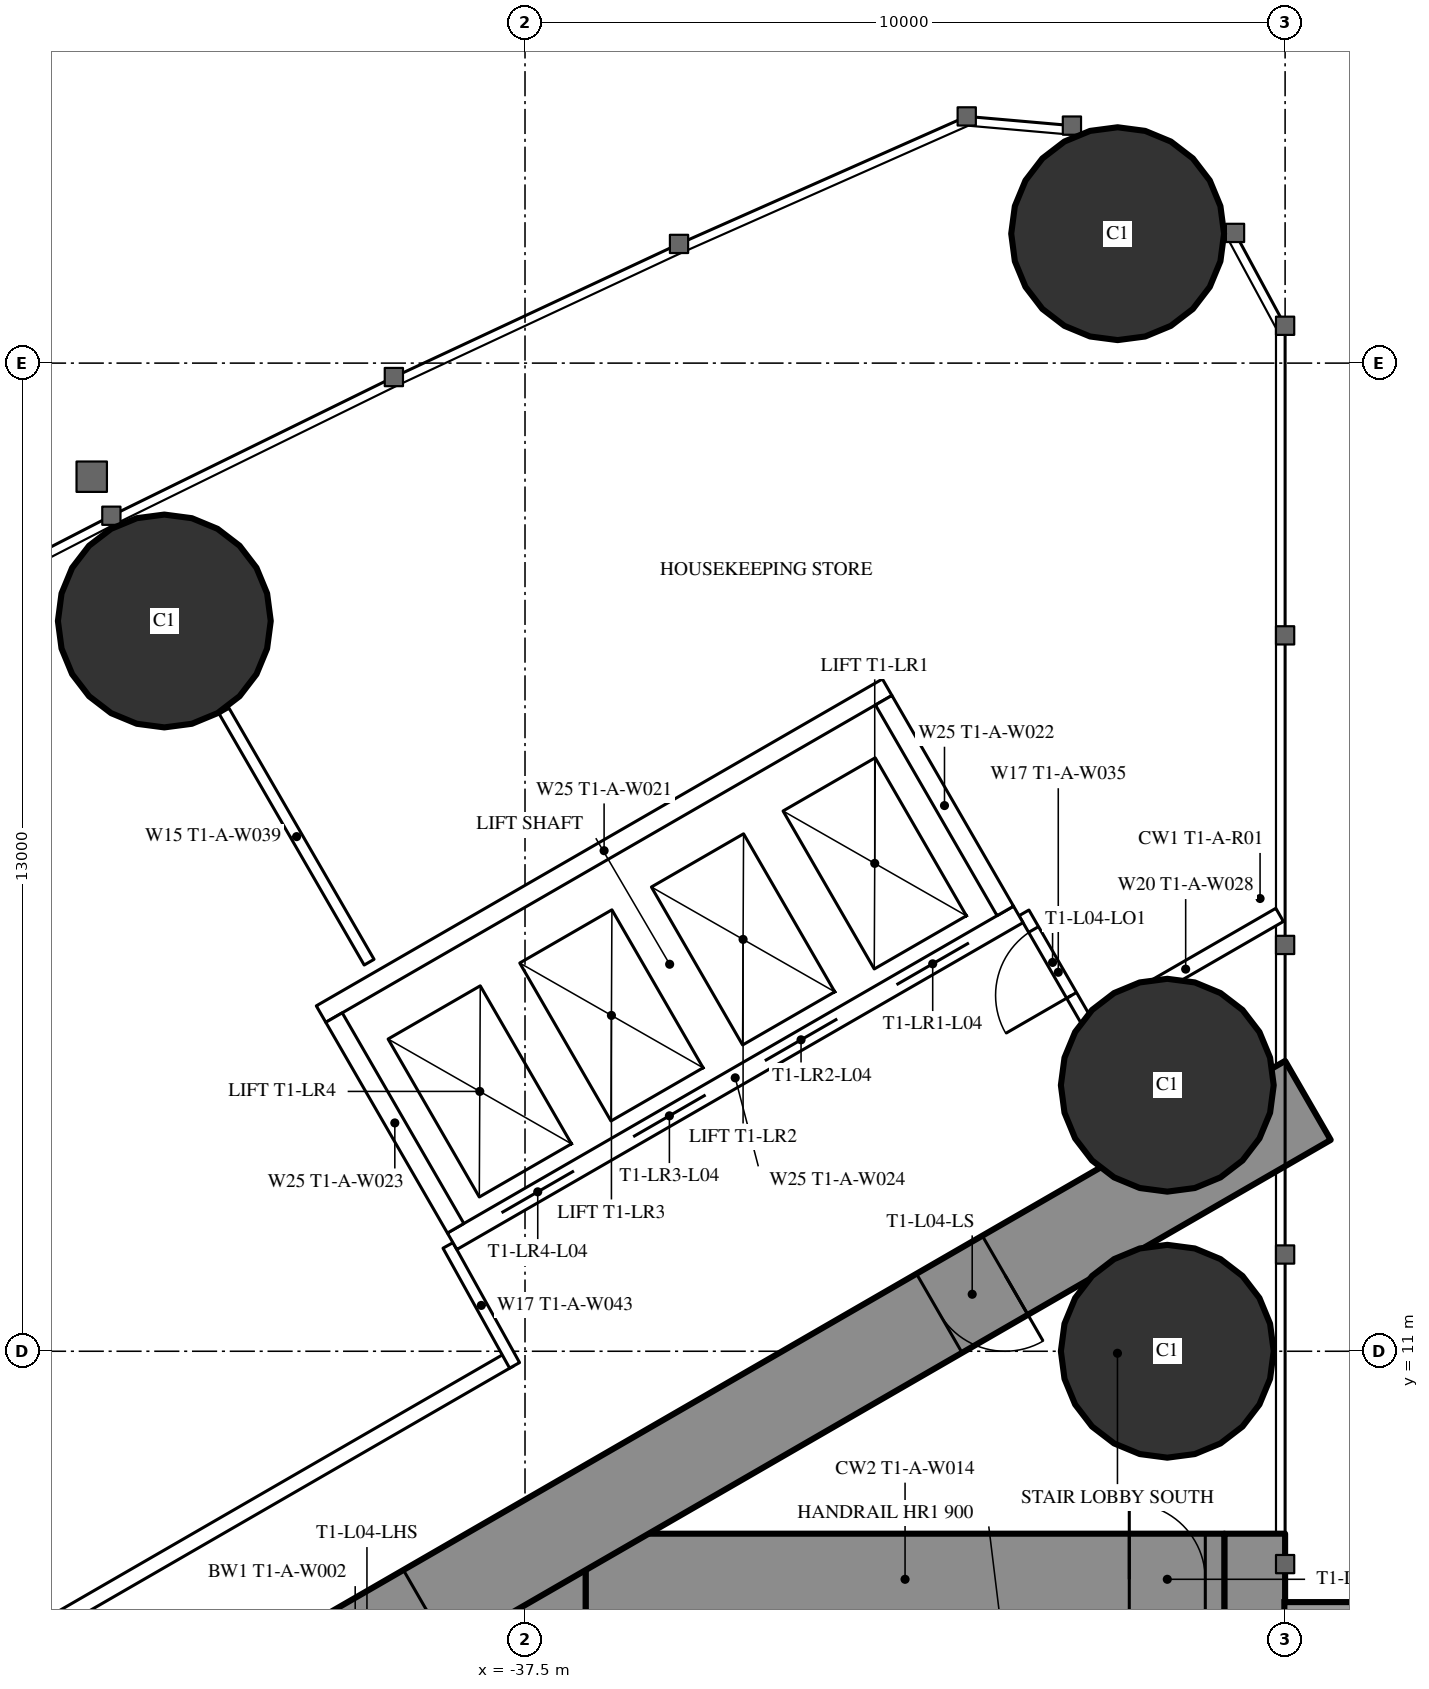
"""IFC4 building model, lengths in metres.
Left out: names, types, materials, properties, quantities, classifications, styles, units other than length and angle.
Written with IfcOpenShell. Run it as: python <this file> out.ifc"""

import sys

from ifc_helpers import new_model, si_unit, direction, frame, frame_2d, origin, origin_2d, place, context, subcontext, project, spatial, rectangle, hollow_circle, extrude, element, fill, save


model = new_model("IFC4")
c1 = context("Model", 3, precision=1e-05, world=origin(), true_north=direction((0.0, 1.0)))
c2 = subcontext(c1, "Body", "Model", "MODEL_VIEW")
j1 = project(units=[si_unit("LENGTHUNIT", "METRE"), si_unit("PLANEANGLEUNIT", "RADIAN")], contexts=[c1])
p1 = place(None, origin())
s1 = spatial("IfcSite", under=j1, at=p1, CompositionType="ELEMENT")
p2 = place(p1, origin())
s2 = spatial("IfcBuilding", under=s1, at=p2, CompositionType="ELEMENT")
p3 = place(p2, frame((0.0, 0.0, 21.5)))
s3 = spatial("IfcBuildingStorey", under=s2, at=p3, CompositionType="ELEMENT", Elevation=21.5)
for number, where, z_axis, x_axis in (
    (1, (-29.703, 25.703, 0.0), (0.0, 0.0, 1.0), (1.0, 0.0, 0.0)),
    (2, (-29.05, 11.0, 0.0), (0.0, 0.0, 1.0), (1.0, 0.0, 0.0)),
    (3, (-29.05, 14.5, 0.0), (0.0, 0.0, 1.0), (1.0, 0.0, 0.0)),
    (4, (-42.245, 20.607, 0.0), (0.0, 0.0, 1.0), (1.0, 0.0, 0.0)),
):
    element("IfcColumn", number, at=place(p3, frame(where, z_axis=z_axis, x_axis=x_axis)), inside=s3, PredefinedType="COLUMN", context=c2, shape_type="SweptSolid", body=[
        extrude(hollow_circle(Radius=1.4, WallThickness=0.12, at=origin_2d()), origin(), (0.0, 0.0, 1.0), 3.5),
    ])
p4 = place(p3, frame((-27.9, 8.6, 0.0), z_axis=(0.0, 0.0, 1.0), x_axis=(0.0, -1.0, 0.0)))
e5 = element("IfcWall", 5, at=p4, inside=s3, PredefinedType="SHEAR", context=c2, shape_type="SweptSolid", body=[
    extrude(rectangle(XDim=17.2, YDim=0.8, at=frame_2d((8.6, 0.0))), origin(), (0.0, 0.0, 1.0), 3.5),
])
p5 = place(p4, frame((2.45, 0.0, 0.6)))
e6 = element("IfcOpeningElement", 6, at=p5, cuts=e5, PredefinedType="OPENING", context=c2, shape_type="SweptSolid", body=[
    extrude(rectangle(XDim=0.6, YDim=2.1, at=frame_2d((0.3, 1.05))), frame((0.0, 0.41, 0.0), z_axis=(0.0, -1.0, 0.0), x_axis=(1.0, 0.0, 0.0)), (0.0, 0.0, 1.0), 0.82),
])
p6 = place(p4, frame((14.15, 0.0, 0.6)))
e7 = element("IfcOpeningElement", 7, at=p6, cuts=e5, PredefinedType="OPENING", context=c2, shape_type="SweptSolid", body=[
    extrude(rectangle(XDim=0.6, YDim=2.1, at=frame_2d((0.3, 1.05))), frame((0.0, 0.41, 0.0), z_axis=(0.0, -1.0, 0.0), x_axis=(1.0, 0.0, 0.0)), (0.0, 0.0, 1.0), 0.82),
])
p7 = place(p3, frame((-37.3, 8.6, 0.0), z_axis=(0.0, 0.0, 1.0), x_axis=(0.0, -1.0, 0.0)))
e8 = element("IfcWall", 8, at=p7, inside=s3, PredefinedType="SHEAR", context=c2, shape_type="SweptSolid", body=[
    extrude(rectangle(XDim=17.2, YDim=1.2, at=frame_2d((8.6, 0.0))), origin(), (0.0, 0.0, 1.0), 3.5),
])
p8 = place(p7, frame((7.7, 0.0, 0.0)))
e9 = element("IfcOpeningElement", 9, at=p8, cuts=e8, PredefinedType="OPENING", context=c2, shape_type="SweptSolid", body=[
    extrude(rectangle(XDim=1.8, YDim=2.2, at=frame_2d((0.9, 1.1))), frame((0.0, 0.61, 0.0), z_axis=(0.0, -1.0, 0.0), x_axis=(1.0, 0.0, 0.0)), (0.0, 0.0, 1.0), 1.22),
])
p9 = place(p3, frame((-28.3, 8.0, 0.0), z_axis=(0.0, 0.0, 1.0), x_axis=(-1.0, 0.0, 0.0)))
e10 = element("IfcWall", 10, at=p9, inside=s3, PredefinedType="SHEAR", context=c2, shape_type="SweptSolid", body=[
    extrude(rectangle(XDim=8.4, YDim=1.2, at=frame_2d((4.2, 0.0))), origin(), (0.0, 0.0, 1.0), 3.5),
])
p10 = place(p9, frame((0.25, 0.0, 0.0)))
e11 = element("IfcOpeningElement", 11, at=p10, cuts=e10, PredefinedType="OPENING", context=c2, shape_type="SweptSolid", body=[
    extrude(rectangle(XDim=1.0, YDim=2.2, at=frame_2d((0.5, 1.1))), frame((0.0, 0.61, 0.0), z_axis=(0.0, -1.0, 0.0), x_axis=(1.0, 0.0, 0.0)), (0.0, 0.0, 1.0), 1.22),
])
p11 = place(p3, frame((-27.2, 14.3, 0.0), z_axis=(0.0, 0.0, 1.0), x_axis=(-0.866026593062, -0.499997940104, 0.0)))
e12 = element("IfcWall", 12, at=p11, inside=s3, PredefinedType="SHEAR", context=c2, shape_type="SweptSolid", body=[
    extrude(rectangle(XDim=28.946, YDim=1.2, at=frame_2d((14.473, 0.0))), origin(), (0.0, 0.0, 1.0), 3.5),
])
p12 = place(p11, frame((4.6, 0.0, 0.0)))
e13 = element("IfcOpeningElement", 13, at=p12, cuts=e12, PredefinedType="OPENING", context=c2, shape_type="SweptSolid", body=[
    extrude(rectangle(XDim=1.0, YDim=2.2, at=frame_2d((0.5, 1.1))), frame((0.0, 0.61, 0.0), z_axis=(0.0, -1.0, 0.0), x_axis=(1.0, 0.0, 0.0)), (0.0, 0.0, 1.0), 1.22),
])
p13 = place(p11, frame((13.395, 0.0, 0.0)))
e14 = element("IfcOpeningElement", 14, at=p13, cuts=e12, PredefinedType="OPENING", context=c2, shape_type="SweptSolid", body=[
    extrude(rectangle(XDim=1.8, YDim=2.2, at=frame_2d((0.9, 1.1))), frame((0.0, 0.61, 0.0), z_axis=(0.0, -1.0, 0.0), x_axis=(1.0, 0.0, 0.0)), (0.0, 0.0, 1.0), 1.22),
])
p14 = place(p3, frame((-39.551, 16.119, 0.0), z_axis=(0.0, 0.0, 1.0), x_axis=(-0.500014214979, 0.866017196607, 0.0)))
e15 = element("IfcWall", 15, at=p14, inside=s3, PredefinedType="PARTITIONING", context=c2, shape_type="SweptSolid", body=[
    extrude(rectangle(XDim=3.815, YDim=0.15, at=frame_2d((1.907, 0.0))), origin(), (0.0, 0.0, 1.0), 3.25),
])
p15 = place(p3, frame((-27.572, 16.741, 0.0), z_axis=(0.0, 0.0, 1.0), x_axis=(-0.866034618596, -0.499984039138, 0.0)))
e16 = element("IfcWall", 16, at=p15, inside=s3, PredefinedType="PARTITIONING", context=c2, shape_type="SweptSolid", body=[
    extrude(rectangle(XDim=2.854, YDim=0.2, at=frame_2d((1.427, 0.0))), origin(), (0.0, 0.0, 1.0), 3.25),
])
p16 = place(p3, frame((-37.7, 10.894, 0.0), z_axis=(0.0, 0.0, 1.0), x_axis=(-0.866027905338, -0.499995667157, 0.0)))
e17 = element("IfcWall", 17, at=p16, inside=s3, PredefinedType="PARTITIONING", context=c2, shape_type="SweptSolid", body=[
    extrude(rectangle(XDim=21.787, YDim=0.2, at=frame_2d((10.894, 0.0))), origin(), (0.0, 0.0, 1.0), 3.25),
])
p17 = place(p16, frame((11.78, 0.0, 0.0)))
e18 = element("IfcOpeningElement", 18, at=p17, cuts=e17, PredefinedType="OPENING", context=c2, shape_type="SweptSolid", body=[
    extrude(rectangle(XDim=0.95, YDim=2.2, at=frame_2d((0.475, 1.1))), frame((0.0, 0.11, 0.0), z_axis=(0.0, -1.0, 0.0), x_axis=(1.0, 0.0, 0.0)), (0.0, 0.0, 1.0), 0.22),
])
p18 = place(p16, frame((7.73, 0.0, 0.0)))
e19 = element("IfcOpeningElement", 19, at=p18, cuts=e17, PredefinedType="OPENING", context=c2, shape_type="SweptSolid", body=[
    extrude(rectangle(XDim=0.95, YDim=2.2, at=frame_2d((0.475, 1.1))), frame((0.0, 0.11, 0.0), z_axis=(0.0, -1.0, 0.0), x_axis=(1.0, 0.0, 0.0)), (0.0, 0.0, 1.0), 0.22),
])
p19 = place(p3, frame((-38.513, 12.392, 0.0), z_axis=(0.0, 0.0, 1.0), x_axis=(0.485585508183, -0.874189175317, 0.0)))
e20 = element("IfcWall", 20, at=p19, inside=s3, PredefinedType="PARTITIONING", context=c2, shape_type="SweptSolid", body=[
    extrude(rectangle(XDim=1.805, YDim=0.15, at=frame_2d((0.902, 0.0))), origin(), (0.0, 0.0, 1.0), 3.25),
])
p20 = place(p3, frame((-30.033, 15.205, 0.0), z_axis=(0.0, 0.0, 1.0), x_axis=(-0.499980071345, 0.866036909293, 0.0)))
e21 = element("IfcWall", 21, at=p20, inside=s3, PredefinedType="PARTITIONING", context=c2, shape_type="SweptSolid", body=[
    extrude(rectangle(XDim=1.805, YDim=0.15, at=frame_2d((0.902, 0.0))), origin(), (0.0, 0.0, 1.0), 3.25),
])
p21 = place(p20, frame((0.552, 0.0, 0.0)))
e22 = element("IfcOpeningElement", 22, at=p21, cuts=e21, PredefinedType="OPENING", context=c2, shape_type="SweptSolid", body=[
    extrude(rectangle(XDim=1.0, YDim=2.2, at=frame_2d((0.5, 1.1))), frame((0.0, 0.085, 0.0), z_axis=(0.0, -1.0, 0.0), x_axis=(1.0, 0.0, 0.0)), (0.0, 0.0, 1.0), 0.17),
])
p22 = place(p3, frame((-31.01, 16.747, 0.0), z_axis=(0.0, 0.0, 1.0), x_axis=(-0.866028165386, -0.499995216735, 0.0)))
e23 = element("IfcWall", 23, at=p22, inside=s3, PredefinedType="PARTITIONING", context=c2, shape_type="SweptSolid", body=[
    extrude(rectangle(XDim=8.6, YDim=0.25, at=frame_2d((4.3, 0.0))), origin(), (0.0, 0.0, 1.0), 3.25),
])
p23 = place(p22, frame((0.75, 0.0, 0.0)))
e24 = element("IfcOpeningElement", 24, at=p23, cuts=e23, PredefinedType="OPENING", context=c2, shape_type="SweptSolid", body=[
    extrude(rectangle(XDim=1.1, YDim=2.2, at=frame_2d((0.55, 1.1))), frame((0.0, 0.135, 0.0), z_axis=(0.0, -1.0, 0.0), x_axis=(1.0, 0.0, 0.0)), (0.0, 0.0, 1.0), 0.27),
])
p24 = place(p22, frame((2.75, 0.0, 0.0)))
e25 = element("IfcOpeningElement", 25, at=p24, cuts=e23, PredefinedType="OPENING", context=c2, shape_type="SweptSolid", body=[
    extrude(rectangle(XDim=1.1, YDim=2.2, at=frame_2d((0.55, 1.1))), frame((0.0, 0.135, 0.0), z_axis=(0.0, -1.0, 0.0), x_axis=(1.0, 0.0, 0.0)), (0.0, 0.0, 1.0), 0.27),
])
p25 = place(p22, frame((4.75, 0.0, 0.0)))
e26 = element("IfcOpeningElement", 26, at=p25, cuts=e23, PredefinedType="OPENING", context=c2, shape_type="SweptSolid", body=[
    extrude(rectangle(XDim=1.1, YDim=2.2, at=frame_2d((0.55, 1.1))), frame((0.0, 0.135, 0.0), z_axis=(0.0, -1.0, 0.0), x_axis=(1.0, 0.0, 0.0)), (0.0, 0.0, 1.0), 0.27),
])
p26 = place(p22, frame((6.75, 0.0, 0.0)))
e27 = element("IfcOpeningElement", 27, at=p26, cuts=e23, PredefinedType="OPENING", context=c2, shape_type="SweptSolid", body=[
    extrude(rectangle(XDim=1.1, YDim=2.2, at=frame_2d((0.55, 1.1))), frame((0.0, 0.135, 0.0), z_axis=(0.0, -1.0, 0.0), x_axis=(1.0, 0.0, 0.0)), (0.0, 0.0, 1.0), 0.27),
])
p27 = place(p3, frame((-32.736, 19.736, 0.0), z_axis=(0.0, 0.0, 1.0), x_axis=(-0.866028165386, -0.499995216735, 0.0)))
e28 = element("IfcWall", 28, at=p27, inside=s3, PredefinedType="PARTITIONING", context=c2, shape_type="SweptSolid", body=[
    extrude(rectangle(XDim=8.6, YDim=0.25, at=frame_2d((4.3, 0.0))), origin(), (0.0, 0.0, 1.0), 3.25),
])
p28 = place(p3, frame((-31.181, 16.793, 0.0), z_axis=(0.0, 0.0, 1.0), x_axis=(-0.499929347863, 0.866066190972, 0.0)))
e29 = element("IfcWall", 29, at=p28, inside=s3, PredefinedType="PARTITIONING", context=c2, shape_type="SweptSolid", body=[
    extrude(rectangle(XDim=3.201, YDim=0.25, at=frame_2d((1.6, 0.0))), origin(), (0.0, 0.0, 1.0), 3.25),
])
p29 = place(p3, frame((-38.413, 12.618, 0.0), z_axis=(0.0, 0.0, 1.0), x_axis=(-0.499872130319, 0.866099216793, 0.0)))
e30 = element("IfcWall", 30, at=p29, inside=s3, PredefinedType="PARTITIONING", context=c2, shape_type="SweptSolid", body=[
    extrude(rectangle(XDim=3.2, YDim=0.25, at=frame_2d((1.6, 0.0))), origin(), (0.0, 0.0, 1.0), 3.25),
])
p30 = place(p21, origin())
e31 = element("IfcDoor", 31, at=p30, inside=s3, OperationType="SINGLE_SWING_LEFT", PredefinedType="DOOR", context=c2, shape_type="SweptSolid", body=[
    extrude(rectangle(XDim=1.0, YDim=2.2, at=frame_2d((0.5, 1.1))), frame((0.0, 0.025, 0.0), z_axis=(0.0, -1.0, 0.0), x_axis=(1.0, 0.0, 0.0)), (0.0, 0.0, 1.0), 0.05),
])
fill(e22, e31)
p31 = place(p12, origin())
e32 = element("IfcDoor", 32, at=p31, inside=s3, OperationType="SINGLE_SWING_LEFT", PredefinedType="DOOR", context=c2, shape_type="SweptSolid", body=[
    extrude(rectangle(XDim=1.0, YDim=2.2, at=frame_2d((0.5, 1.1))), frame((0.0, 0.025, 0.0), z_axis=(0.0, -1.0, 0.0), x_axis=(1.0, 0.0, 0.0)), (0.0, 0.0, 1.0), 0.05),
])
fill(e13, e32)
p32 = place(p13, origin())
e33 = element("IfcDoor", 33, at=p32, inside=s3, OperationType="DOUBLE_DOOR_SINGLE_SWING", PredefinedType="DOOR", context=c2, shape_type="SweptSolid", body=[
    extrude(rectangle(XDim=1.8, YDim=2.2, at=frame_2d((0.9, 1.1))), frame((0.0, 0.025, 0.0), z_axis=(0.0, -1.0, 0.0), x_axis=(1.0, 0.0, 0.0)), (0.0, 0.0, 1.0), 0.05),
])
fill(e14, e33)
p33 = place(p10, origin())
e34 = element("IfcDoor", 34, at=p33, inside=s3, OperationType="SINGLE_SWING_RIGHT", PredefinedType="DOOR", context=c2, shape_type="SweptSolid", body=[
    extrude(rectangle(XDim=1.0, YDim=2.2, at=frame_2d((0.5, 1.1))), frame((0.0, 0.025, 0.0), z_axis=(0.0, -1.0, 0.0), x_axis=(1.0, 0.0, 0.0)), (0.0, 0.0, 1.0), 0.05),
])
fill(e11, e34)
p34 = place(p23, origin())
e35 = element("IfcDoor", 35, at=p34, inside=s3, OperationType="DOUBLE_DOOR_SLIDING", PredefinedType="USERDEFINED", context=c2, shape_type="SweptSolid", body=[
    extrude(rectangle(XDim=1.1, YDim=2.2, at=frame_2d((0.55, 1.1))), frame((0.0, 0.025, 0.0), z_axis=(0.0, -1.0, 0.0), x_axis=(1.0, 0.0, 0.0)), (0.0, 0.0, 1.0), 0.05),
])
fill(e24, e35)
p35 = place(p24, origin())
e36 = element("IfcDoor", 36, at=p35, inside=s3, OperationType="DOUBLE_DOOR_SLIDING", PredefinedType="USERDEFINED", context=c2, shape_type="SweptSolid", body=[
    extrude(rectangle(XDim=1.1, YDim=2.2, at=frame_2d((0.55, 1.1))), frame((0.0, 0.025, 0.0), z_axis=(0.0, -1.0, 0.0), x_axis=(1.0, 0.0, 0.0)), (0.0, 0.0, 1.0), 0.05),
])
fill(e25, e36)
p36 = place(p25, origin())
e37 = element("IfcDoor", 37, at=p36, inside=s3, OperationType="DOUBLE_DOOR_SLIDING", PredefinedType="USERDEFINED", context=c2, shape_type="SweptSolid", body=[
    extrude(rectangle(XDim=1.1, YDim=2.2, at=frame_2d((0.55, 1.1))), frame((0.0, 0.025, 0.0), z_axis=(0.0, -1.0, 0.0), x_axis=(1.0, 0.0, 0.0)), (0.0, 0.0, 1.0), 0.05),
])
fill(e26, e37)
p37 = place(p26, origin())
e38 = element("IfcDoor", 38, at=p37, inside=s3, OperationType="DOUBLE_DOOR_SLIDING", PredefinedType="USERDEFINED", context=c2, shape_type="SweptSolid", body=[
    extrude(rectangle(XDim=1.1, YDim=2.2, at=frame_2d((0.55, 1.1))), frame((0.0, 0.025, 0.0), z_axis=(0.0, -1.0, 0.0), x_axis=(1.0, 0.0, 0.0)), (0.0, 0.0, 1.0), 0.05),
])
fill(e27, e38)
save(model, sys.argv[1])
